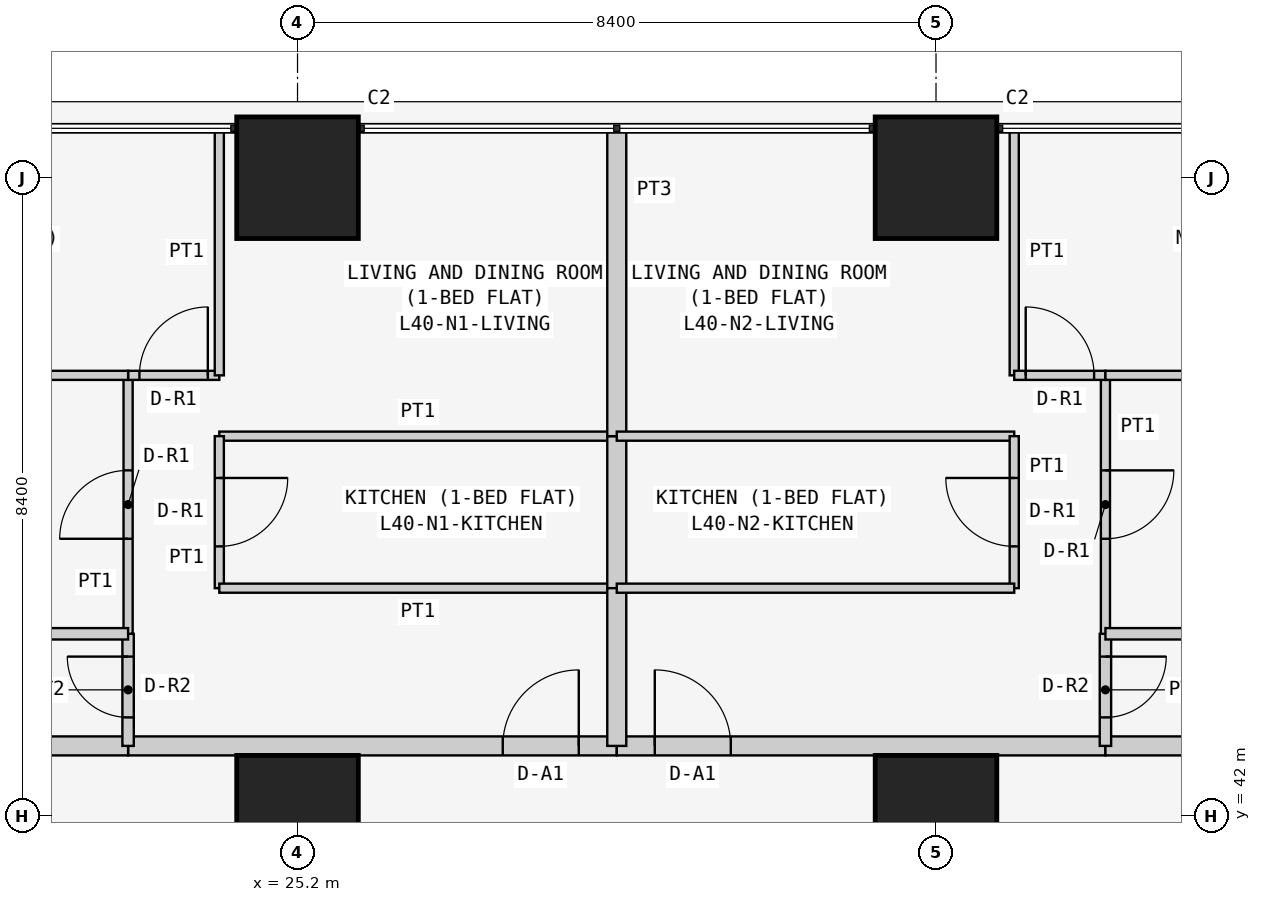
"""IFC4 building model, lengths in metres.
Left out: names, types, materials, properties, quantities, classifications, styles, units other than length and angle.
Written with IfcOpenShell. Run it as: python <this file> out.ifc"""

import sys

from ifc_helpers import new_model, si_unit, direction, frame, frame_2d, origin, origin_2d, place, context, subcontext, project, spatial, rectangle, extrude, element, fill, save


model = new_model("IFC4")
c1 = context("Model", 3, precision=1e-05, world=origin(), true_north=direction((0.0, 1.0)))
c2 = subcontext(c1, "Body", "Model", "MODEL_VIEW")
j1 = project(units=[si_unit("LENGTHUNIT", "METRE"), si_unit("PLANEANGLEUNIT", "RADIAN")], contexts=[c1])
p1 = place(None, origin())
s1 = spatial("IfcSite", under=j1, at=p1, CompositionType="ELEMENT")
p2 = place(p1, origin())
s2 = spatial("IfcBuilding", under=s1, at=p2, CompositionType="ELEMENT")
p3 = place(p2, frame((0.0, 0.0, 155.7)))
s3 = spatial("IfcBuildingStorey", under=s2, at=p3, CompositionType="ELEMENT", Elevation=155.7)
for number, where, z_axis, x_axis in (
    (1, (25.2, 42.0, 0.0), (0.0, 0.0, 1.0), (1.0, 0.0, 0.0)),
    (2, (25.2, 50.4, 0.0), (0.0, 0.0, 1.0), (1.0, 0.0, 0.0)),
    (3, (33.6, 42.0, 0.0), (0.0, 0.0, 1.0), (1.0, 0.0, 0.0)),
    (4, (33.6, 50.4, 0.0), (0.0, 0.0, 1.0), (1.0, 0.0, 0.0)),
):
    element("IfcColumn", number, at=place(p3, frame(where, z_axis=z_axis, x_axis=x_axis)), inside=s3, PredefinedType="COLUMN", context=c2, shape_type="SweptSolid", body=[
        extrude(rectangle(XDim=1.6, YDim=1.6, at=origin_2d()), origin(), (0.0, 0.0, 1.0), 3.6),
    ])
p4 = place(p3, frame((22.971, 42.925, 0.0), z_axis=(0.0, 0.0, 1.0), x_axis=(1.0, 0.0, 0.0)))
e5 = element("IfcWall", 5, at=p4, inside=s3, PredefinedType="PARTITIONING", context=c2, shape_type="SweptSolid", body=[
    extrude(rectangle(XDim=6.429, YDim=0.25, at=frame_2d((3.214, 0.0))), origin(), (0.0, 0.0, 1.0), 3.45),
])
p5 = place(p4, frame((4.929, 0.0, 0.0)))
e6 = element("IfcOpeningElement", 6, at=p5, cuts=e5, PredefinedType="OPENING", context=c2, shape_type="SweptSolid", body=[
    extrude(rectangle(XDim=1.0, YDim=2.1, at=frame_2d((0.5, 1.05))), frame((0.0, 0.135, 0.0), z_axis=(0.0, -1.0, 0.0), x_axis=(1.0, 0.0, 0.0)), (0.0, 0.0, 1.0), 0.27),
])
p6 = place(p3, frame((16.1, 42.925, 0.0), z_axis=(0.0, 0.0, 1.0), x_axis=(1.0, 0.0, 0.0)))
e7 = element("IfcWall", 7, at=p6, inside=s3, PredefinedType="PARTITIONING", context=c2, shape_type="SweptSolid", body=[
    extrude(rectangle(XDim=6.871, YDim=0.25, at=frame_2d((3.436, 0.0))), origin(), (0.0, 0.0, 1.0), 3.45),
])
p7 = place(p3, frame((29.4, 42.925, 0.0), z_axis=(0.0, 0.0, 1.0), x_axis=(1.0, 0.0, 0.0)))
e8 = element("IfcWall", 8, at=p7, inside=s3, PredefinedType="PARTITIONING", context=c2, shape_type="SweptSolid", body=[
    extrude(rectangle(XDim=6.429, YDim=0.25, at=frame_2d((3.215, 0.0))), origin(), (0.0, 0.0, 1.0), 3.45),
])
p8 = place(p7, frame((0.5, 0.0, 0.0)))
e9 = element("IfcOpeningElement", 9, at=p8, cuts=e8, PredefinedType="OPENING", context=c2, shape_type="SweptSolid", body=[
    extrude(rectangle(XDim=1.0, YDim=2.1, at=frame_2d((0.5, 1.05))), frame((0.0, 0.135, 0.0), z_axis=(0.0, -1.0, 0.0), x_axis=(1.0, 0.0, 0.0)), (0.0, 0.0, 1.0), 0.27),
])
p9 = place(p3, frame((35.829, 42.925, 0.0), z_axis=(0.0, 0.0, 1.0), x_axis=(1.0, 0.0, 0.0)))
e10 = element("IfcWall", 10, at=p9, inside=s3, PredefinedType="PARTITIONING", context=c2, shape_type="SweptSolid", body=[
    extrude(rectangle(XDim=6.871, YDim=0.25, at=frame_2d((3.436, 0.0))), origin(), (0.0, 0.0, 1.0), 3.45),
])
p10 = place(p3, frame((29.4, 47.0, 0.0), z_axis=(0.0, 0.0, 1.0), x_axis=(-1.0, 0.0, 0.0)))
e11 = element("IfcWall", 11, at=p10, inside=s3, PredefinedType="PARTITIONING", context=c2, shape_type="SweptSolid", body=[
    extrude(rectangle(XDim=5.229, YDim=0.12, at=frame_2d((2.615, 0.0))), origin(), (0.0, 0.0, 1.0), 3.45),
])
p11 = place(p3, frame((24.171, 47.0, 0.0), z_axis=(0.0, 0.0, 1.0), x_axis=(0.0, -1.0, 0.0)))
e12 = element("IfcWall", 12, at=p11, inside=s3, PredefinedType="PARTITIONING", context=c2, shape_type="SweptSolid", body=[
    extrude(rectangle(XDim=2.0, YDim=0.12, at=frame_2d((1.0, 0.0))), origin(), (0.0, 0.0, 1.0), 3.45),
])
p12 = place(p11, frame((0.55, 0.0, 0.0)))
e13 = element("IfcOpeningElement", 13, at=p12, cuts=e12, PredefinedType="OPENING", context=c2, shape_type="SweptSolid", body=[
    extrude(rectangle(XDim=0.9, YDim=2.1, at=frame_2d((0.45, 1.05))), frame((0.0, 0.07, 0.0), z_axis=(0.0, -1.0, 0.0), x_axis=(1.0, 0.0, 0.0)), (0.0, 0.0, 1.0), 0.14),
])
p13 = place(p3, frame((24.171, 45.0, 0.0), z_axis=(0.0, 0.0, 1.0), x_axis=(1.0, 0.0, 0.0)))
e14 = element("IfcWall", 14, at=p13, inside=s3, PredefinedType="PARTITIONING", context=c2, shape_type="SweptSolid", body=[
    extrude(rectangle(XDim=5.229, YDim=0.12, at=frame_2d((2.615, 0.0))), origin(), (0.0, 0.0, 1.0), 3.45),
])
p14 = place(p3, frame((29.4, 45.0, 0.0), z_axis=(0.0, 0.0, 1.0), x_axis=(0.0, 1.0, 0.0)))
e15 = element("IfcWall", 15, at=p14, inside=s3, PredefinedType="PARTITIONING", context=c2, shape_type="SweptSolid", body=[
    extrude(rectangle(XDim=2.0, YDim=0.25, at=frame_2d((1.0, 0.0))), origin(), (0.0, 0.0, 1.0), 2.848),
])
p15 = place(p3, frame((22.971, 42.925, 0.0), z_axis=(0.0, 0.0, 1.0), x_axis=(0.0, 1.0, 0.0)))
e16 = element("IfcWall", 16, at=p15, inside=s3, PredefinedType="PARTITIONING", context=c2, shape_type="SweptSolid", body=[
    extrude(rectangle(XDim=1.475, YDim=0.15, at=frame_2d((0.737, 0.0))), origin(), (0.0, 0.0, 1.0), 3.45),
])
p16 = place(p15, frame((0.375, 0.0, 0.0)))
e17 = element("IfcOpeningElement", 17, at=p16, cuts=e16, PredefinedType="OPENING", context=c2, shape_type="SweptSolid", body=[
    extrude(rectangle(XDim=0.8, YDim=2.1, at=frame_2d((0.4, 1.05))), frame((0.0, 0.085, 0.0), z_axis=(0.0, -1.0, 0.0), x_axis=(1.0, 0.0, 0.0)), (0.0, 0.0, 1.0), 0.17),
])
p17 = place(p3, frame((22.971, 44.4, 0.0), z_axis=(0.0, 0.0, 1.0), x_axis=(0.0, 1.0, 0.0)))
e18 = element("IfcWall", 18, at=p17, inside=s3, PredefinedType="PARTITIONING", context=c2, shape_type="SweptSolid", body=[
    extrude(rectangle(XDim=3.4, YDim=0.12, at=frame_2d((1.7, 0.0))), origin(), (0.0, 0.0, 1.0), 3.45),
])
p18 = place(p17, frame((1.25, 0.0, 0.0)))
e19 = element("IfcOpeningElement", 19, at=p18, cuts=e18, PredefinedType="OPENING", context=c2, shape_type="SweptSolid", body=[
    extrude(rectangle(XDim=0.9, YDim=2.1, at=frame_2d((0.45, 1.05))), frame((0.0, 0.07, 0.0), z_axis=(0.0, -1.0, 0.0), x_axis=(1.0, 0.0, 0.0)), (0.0, 0.0, 1.0), 0.14),
])
p19 = place(p3, frame((22.971, 47.8, 0.0), z_axis=(0.0, 0.0, 1.0), x_axis=(1.0, 0.0, 0.0)))
e20 = element("IfcWall", 20, at=p19, inside=s3, PredefinedType="PARTITIONING", context=c2, shape_type="SweptSolid", body=[
    extrude(rectangle(XDim=1.2, YDim=0.12, at=frame_2d((0.6, 0.0))), origin(), (0.0, 0.0, 1.0), 3.45),
])
p20 = place(p19, frame((0.149, 0.0, 0.0)))
e21 = element("IfcOpeningElement", 21, at=p20, cuts=e20, PredefinedType="OPENING", context=c2, shape_type="SweptSolid", body=[
    extrude(rectangle(XDim=0.9, YDim=2.1, at=frame_2d((0.45, 1.05))), frame((0.0, 0.07, 0.0), z_axis=(0.0, -1.0, 0.0), x_axis=(1.0, 0.0, 0.0)), (0.0, 0.0, 1.0), 0.14),
])
p21 = place(p3, frame((24.171, 47.8, 0.0), z_axis=(0.0, 0.0, 1.0), x_axis=(0.0, 1.0, 0.0)))
e22 = element("IfcWall", 22, at=p21, inside=s3, PredefinedType="PARTITIONING", context=c2, shape_type="SweptSolid", body=[
    extrude(rectangle(XDim=3.25, YDim=0.12, at=frame_2d((1.625, 0.0))), origin(), (0.0, 0.0, 1.0), 3.45),
])
p22 = place(p3, frame((29.4, 45.0, 0.0), z_axis=(0.0, 0.0, 1.0), x_axis=(0.0, -1.0, 0.0)))
e23 = element("IfcWall", 23, at=p22, inside=s3, PredefinedType="PARTITIONING", context=c2, shape_type="SweptSolid", body=[
    extrude(rectangle(XDim=2.075, YDim=0.25, at=frame_2d((1.038, 0.0))), origin(), (0.0, 0.0, 1.0), 2.848),
])
p23 = place(p3, frame((29.4, 51.05, 0.0), z_axis=(0.0, 0.0, 1.0), x_axis=(0.0, -1.0, 0.0)))
e24 = element("IfcWall", 24, at=p23, inside=s3, PredefinedType="PARTITIONING", context=c2, shape_type="SweptSolid", body=[
    extrude(rectangle(XDim=4.05, YDim=0.25, at=frame_2d((2.025, 0.0))), origin(), (0.0, 0.0, 1.0), 2.848),
])
p24 = place(p3, frame((22.971, 44.4, 0.0), z_axis=(0.0, 0.0, 1.0), x_axis=(-1.0, 0.0, 0.0)))
e25 = element("IfcWall", 25, at=p24, inside=s3, PredefinedType="PARTITIONING", context=c2, shape_type="SweptSolid", body=[
    extrude(rectangle(XDim=6.871, YDim=0.15, at=frame_2d((3.436, 0.0))), origin(), (0.0, 0.0, 1.0), 3.45),
])
p25 = place(p3, frame((22.971, 47.8, 0.0), z_axis=(0.0, 0.0, 1.0), x_axis=(-1.0, 0.0, 0.0)))
e26 = element("IfcWall", 26, at=p25, inside=s3, PredefinedType="PARTITIONING", context=c2, shape_type="SweptSolid", body=[
    extrude(rectangle(XDim=6.871, YDim=0.12, at=frame_2d((3.436, 0.0))), origin(), (0.0, 0.0, 1.0), 3.45),
])
p26 = place(p3, frame((29.4, 47.0, 0.0), z_axis=(0.0, 0.0, 1.0), x_axis=(1.0, 0.0, 0.0)))
e27 = element("IfcWall", 27, at=p26, inside=s3, PredefinedType="PARTITIONING", context=c2, shape_type="SweptSolid", body=[
    extrude(rectangle(XDim=5.229, YDim=0.12, at=frame_2d((2.615, 0.0))), origin(), (0.0, 0.0, 1.0), 3.45),
])
p27 = place(p3, frame((34.629, 47.0, 0.0), z_axis=(0.0, 0.0, 1.0), x_axis=(0.0, -1.0, 0.0)))
e28 = element("IfcWall", 28, at=p27, inside=s3, PredefinedType="PARTITIONING", context=c2, shape_type="SweptSolid", body=[
    extrude(rectangle(XDim=2.0, YDim=0.12, at=frame_2d((1.0, 0.0))), origin(), (0.0, 0.0, 1.0), 3.45),
])
p28 = place(p27, frame((0.55, 0.0, 0.0)))
e29 = element("IfcOpeningElement", 29, at=p28, cuts=e28, PredefinedType="OPENING", context=c2, shape_type="SweptSolid", body=[
    extrude(rectangle(XDim=0.9, YDim=2.1, at=frame_2d((0.45, 1.05))), frame((0.0, 0.07, 0.0), z_axis=(0.0, -1.0, 0.0), x_axis=(1.0, 0.0, 0.0)), (0.0, 0.0, 1.0), 0.14),
])
p29 = place(p3, frame((34.629, 45.0, 0.0), z_axis=(0.0, 0.0, 1.0), x_axis=(-1.0, 0.0, 0.0)))
e30 = element("IfcWall", 30, at=p29, inside=s3, PredefinedType="PARTITIONING", context=c2, shape_type="SweptSolid", body=[
    extrude(rectangle(XDim=5.229, YDim=0.12, at=frame_2d((2.615, 0.0))), origin(), (0.0, 0.0, 1.0), 3.45),
])
p30 = place(p3, frame((35.829, 44.4, 0.0), z_axis=(0.0, 0.0, 1.0), x_axis=(0.0, -1.0, 0.0)))
e31 = element("IfcWall", 31, at=p30, inside=s3, PredefinedType="PARTITIONING", context=c2, shape_type="SweptSolid", body=[
    extrude(rectangle(XDim=1.475, YDim=0.15, at=frame_2d((0.737, 0.0))), origin(), (0.0, 0.0, 1.0), 3.45),
])
p31 = place(p30, frame((0.3, 0.0, 0.0)))
e32 = element("IfcOpeningElement", 32, at=p31, cuts=e31, PredefinedType="OPENING", context=c2, shape_type="SweptSolid", body=[
    extrude(rectangle(XDim=0.8, YDim=2.1, at=frame_2d((0.4, 1.05))), frame((0.0, 0.085, 0.0), z_axis=(0.0, -1.0, 0.0), x_axis=(1.0, 0.0, 0.0)), (0.0, 0.0, 1.0), 0.17),
])
p32 = place(p3, frame((35.829, 47.8, 0.0), z_axis=(0.0, 0.0, 1.0), x_axis=(0.0, -1.0, 0.0)))
e33 = element("IfcWall", 33, at=p32, inside=s3, PredefinedType="PARTITIONING", context=c2, shape_type="SweptSolid", body=[
    extrude(rectangle(XDim=3.4, YDim=0.12, at=frame_2d((1.7, 0.0))), origin(), (0.0, 0.0, 1.0), 3.45),
])
p33 = place(p32, frame((1.25, 0.0, 0.0)))
e34 = element("IfcOpeningElement", 34, at=p33, cuts=e33, PredefinedType="OPENING", context=c2, shape_type="SweptSolid", body=[
    extrude(rectangle(XDim=0.9, YDim=2.1, at=frame_2d((0.45, 1.05))), frame((0.0, 0.07, 0.0), z_axis=(0.0, -1.0, 0.0), x_axis=(1.0, 0.0, 0.0)), (0.0, 0.0, 1.0), 0.14),
])
p34 = place(p3, frame((34.629, 51.05, 0.0), z_axis=(0.0, 0.0, 1.0), x_axis=(0.0, -1.0, 0.0)))
e35 = element("IfcWall", 35, at=p34, inside=s3, PredefinedType="PARTITIONING", context=c2, shape_type="SweptSolid", body=[
    extrude(rectangle(XDim=3.25, YDim=0.12, at=frame_2d((1.625, 0.0))), origin(), (0.0, 0.0, 1.0), 3.45),
])
p35 = place(p3, frame((34.629, 47.8, 0.0), z_axis=(0.0, 0.0, 1.0), x_axis=(1.0, 0.0, 0.0)))
e36 = element("IfcWall", 36, at=p35, inside=s3, PredefinedType="PARTITIONING", context=c2, shape_type="SweptSolid", body=[
    extrude(rectangle(XDim=1.2, YDim=0.12, at=frame_2d((0.6, 0.0))), origin(), (0.0, 0.0, 1.0), 3.45),
])
p36 = place(p35, frame((0.151, 0.0, 0.0)))
e37 = element("IfcOpeningElement", 37, at=p36, cuts=e36, PredefinedType="OPENING", context=c2, shape_type="SweptSolid", body=[
    extrude(rectangle(XDim=0.9, YDim=2.1, at=frame_2d((0.45, 1.05))), frame((0.0, 0.07, 0.0), z_axis=(0.0, -1.0, 0.0), x_axis=(1.0, 0.0, 0.0)), (0.0, 0.0, 1.0), 0.14),
])
p37 = place(p3, frame((35.829, 44.4, 0.0), z_axis=(0.0, 0.0, 1.0), x_axis=(1.0, 0.0, 0.0)))
e38 = element("IfcWall", 38, at=p37, inside=s3, PredefinedType="PARTITIONING", context=c2, shape_type="SweptSolid", body=[
    extrude(rectangle(XDim=6.871, YDim=0.15, at=frame_2d((3.436, 0.0))), origin(), (0.0, 0.0, 1.0), 3.45),
])
p38 = place(p3, frame((35.829, 47.8, 0.0), z_axis=(0.0, 0.0, 1.0), x_axis=(1.0, 0.0, 0.0)))
e39 = element("IfcWall", 39, at=p38, inside=s3, PredefinedType="PARTITIONING", context=c2, shape_type="SweptSolid", body=[
    extrude(rectangle(XDim=6.871, YDim=0.12, at=frame_2d((3.436, 0.0))), origin(), (0.0, 0.0, 1.0), 3.45),
])
p39 = place(p5, origin())
e40 = element("IfcDoor", 40, at=p39, inside=s3, OperationType="SINGLE_SWING_RIGHT", PredefinedType="DOOR", context=c2, shape_type="SweptSolid", body=[
    extrude(rectangle(XDim=1.0, YDim=2.1, at=frame_2d((0.5, 1.05))), frame((0.0, 0.025, 0.0), z_axis=(0.0, -1.0, 0.0), x_axis=(1.0, 0.0, 0.0)), (0.0, 0.0, 1.0), 0.05),
])
fill(e6, e40)
p40 = place(p12, origin())
e41 = element("IfcDoor", 41, at=p40, inside=s3, OperationType="SINGLE_SWING_LEFT", PredefinedType="DOOR", context=c2, shape_type="SweptSolid", body=[
    extrude(rectangle(XDim=0.9, YDim=2.1, at=frame_2d((0.45, 1.05))), frame((0.0, 0.025, 0.0), z_axis=(0.0, -1.0, 0.0), x_axis=(1.0, 0.0, 0.0)), (0.0, 0.0, 1.0), 0.05),
])
fill(e13, e41)
p41 = place(p16, origin())
e42 = element("IfcDoor", 42, at=p41, inside=s3, OperationType="SINGLE_SWING_RIGHT", PredefinedType="DOOR", context=c2, shape_type="SweptSolid", body=[
    extrude(rectangle(XDim=0.8, YDim=2.1, at=frame_2d((0.4, 1.05))), frame((0.0, 0.025, 0.0), z_axis=(0.0, -1.0, 0.0), x_axis=(1.0, 0.0, 0.0)), (0.0, 0.0, 1.0), 0.05),
])
fill(e17, e42)
p42 = place(p18, origin())
e43 = element("IfcDoor", 43, at=p42, inside=s3, OperationType="SINGLE_SWING_LEFT", PredefinedType="DOOR", context=c2, shape_type="SweptSolid", body=[
    extrude(rectangle(XDim=0.9, YDim=2.1, at=frame_2d((0.45, 1.05))), frame((0.0, 0.025, 0.0), z_axis=(0.0, -1.0, 0.0), x_axis=(1.0, 0.0, 0.0)), (0.0, 0.0, 1.0), 0.05),
])
fill(e19, e43)
p43 = place(p20, origin())
e44 = element("IfcDoor", 44, at=p43, inside=s3, OperationType="SINGLE_SWING_RIGHT", PredefinedType="DOOR", context=c2, shape_type="SweptSolid", body=[
    extrude(rectangle(XDim=0.9, YDim=2.1, at=frame_2d((0.45, 1.05))), frame((0.0, 0.025, 0.0), z_axis=(0.0, -1.0, 0.0), x_axis=(1.0, 0.0, 0.0)), (0.0, 0.0, 1.0), 0.05),
])
fill(e21, e44)
p44 = place(p8, origin())
e45 = element("IfcDoor", 45, at=p44, inside=s3, OperationType="SINGLE_SWING_LEFT", PredefinedType="DOOR", context=c2, shape_type="SweptSolid", body=[
    extrude(rectangle(XDim=1.0, YDim=2.1, at=frame_2d((0.5, 1.05))), frame((0.0, 0.025, 0.0), z_axis=(0.0, -1.0, 0.0), x_axis=(1.0, 0.0, 0.0)), (0.0, 0.0, 1.0), 0.05),
])
fill(e9, e45)
p45 = place(p28, frame((0.9, 0.0, 0.0), z_axis=(0.0, 0.0, 1.0), x_axis=(-1.0, 0.0, 0.0)))
e46 = element("IfcDoor", 46, at=p45, inside=s3, OperationType="SINGLE_SWING_RIGHT", PredefinedType="DOOR", context=c2, shape_type="SweptSolid", body=[
    extrude(rectangle(XDim=0.9, YDim=2.1, at=frame_2d((0.45, 1.05))), frame((0.0, 0.025, 0.0), z_axis=(0.0, -1.0, 0.0), x_axis=(1.0, 0.0, 0.0)), (0.0, 0.0, 1.0), 0.05),
])
fill(e29, e46)
p46 = place(p31, origin())
e47 = element("IfcDoor", 47, at=p46, inside=s3, OperationType="SINGLE_SWING_LEFT", PredefinedType="DOOR", context=c2, shape_type="SweptSolid", body=[
    extrude(rectangle(XDim=0.8, YDim=2.1, at=frame_2d((0.4, 1.05))), frame((0.0, 0.025, 0.0), z_axis=(0.0, -1.0, 0.0), x_axis=(1.0, 0.0, 0.0)), (0.0, 0.0, 1.0), 0.05),
])
fill(e32, e47)
p47 = place(p33, origin())
e48 = element("IfcDoor", 48, at=p47, inside=s3, OperationType="SINGLE_SWING_LEFT", PredefinedType="DOOR", context=c2, shape_type="SweptSolid", body=[
    extrude(rectangle(XDim=0.9, YDim=2.1, at=frame_2d((0.45, 1.05))), frame((0.0, 0.025, 0.0), z_axis=(0.0, -1.0, 0.0), x_axis=(1.0, 0.0, 0.0)), (0.0, 0.0, 1.0), 0.05),
])
fill(e34, e48)
p48 = place(p36, origin())
e49 = element("IfcDoor", 49, at=p48, inside=s3, OperationType="SINGLE_SWING_LEFT", PredefinedType="DOOR", context=c2, shape_type="SweptSolid", body=[
    extrude(rectangle(XDim=0.9, YDim=2.1, at=frame_2d((0.45, 1.05))), frame((0.0, 0.025, 0.0), z_axis=(0.0, -1.0, 0.0), x_axis=(1.0, 0.0, 0.0)), (0.0, 0.0, 1.0), 0.05),
])
fill(e37, e49)
save(model, sys.argv[1])
